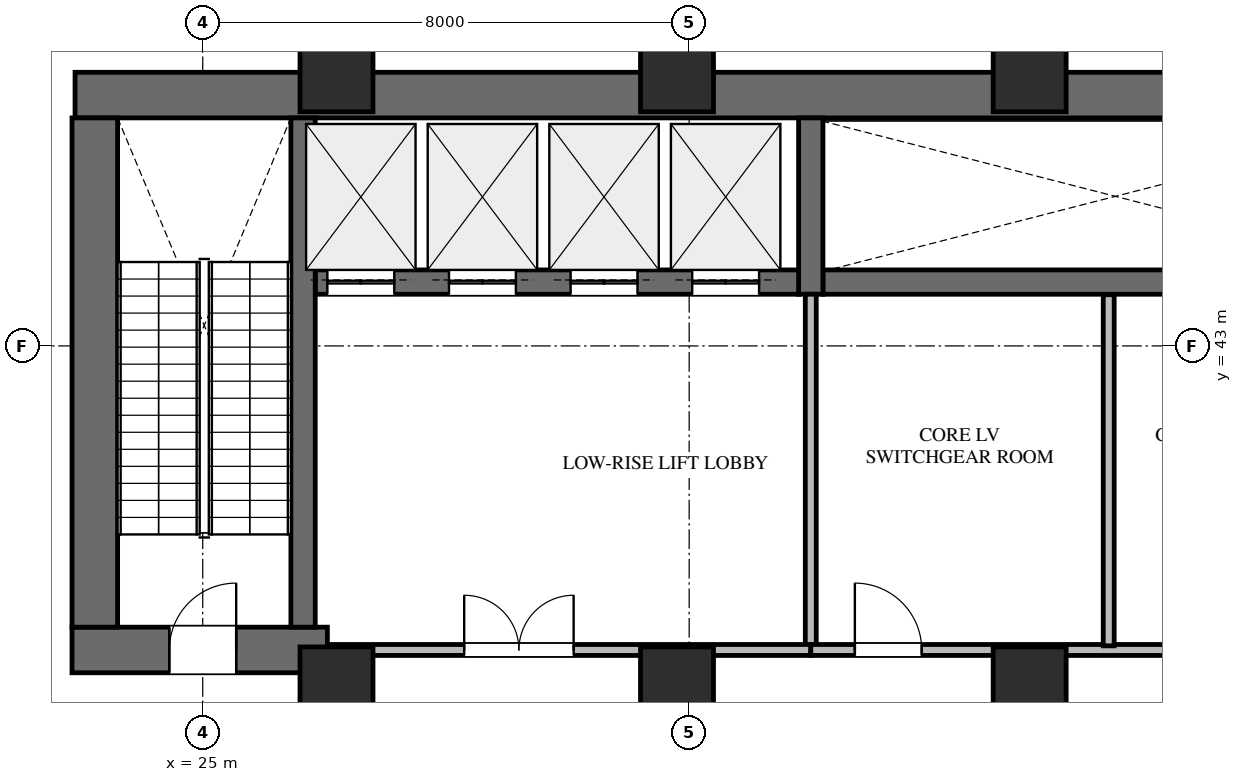
"""IFC4 building model, lengths in metres.
Left out: names, types, materials, properties, quantities, classifications, styles, units other than length and angle.
Written with IfcOpenShell. Run it as: python <this file> out.ifc"""

import sys

from ifc_helpers import new_model, si_unit, direction, frame, frame_2d, origin, origin_2d, place, context, subcontext, project, spatial, rectangle, extrude, element, fill, save


model = new_model("IFC4")
c1 = context("Model", 3, precision=1e-05, world=origin(), true_north=direction((0.0, 1.0)))
c2 = subcontext(c1, "Body", "Model", "MODEL_VIEW")
j1 = project(units=[si_unit("LENGTHUNIT", "METRE"), si_unit("PLANEANGLEUNIT", "RADIAN")], contexts=[c1])
p1 = place(None, origin())
s1 = spatial("IfcSite", under=j1, at=p1, CompositionType="ELEMENT")
p2 = place(p1, origin())
s2 = spatial("IfcBuilding", under=s1, at=p2, CompositionType="ELEMENT")
p3 = place(p2, frame((0.0, 0.0, 85.5)))
s3 = spatial("IfcBuildingStorey", under=s2, at=p3, CompositionType="ELEMENT", Elevation=85.5)
p4 = place(p3, frame((22.9, 47.125, 0.0), z_axis=(0.0, 0.0, 1.0), x_axis=(1.0, 0.0, 0.0)))
e1 = element("IfcWall", 1, at=p4, inside=s3, PredefinedType="SHEAR", context=c2, shape_type="SweptSolid", body=[
    extrude(rectangle(XDim=43.7, YDim=0.75, at=frame_2d((21.85, 0.0))), origin(), (0.0, 0.0, 1.0), 6.0),
])
p5 = place(p3, frame((35.2, 44.05, 0.0), z_axis=(0.0, 0.0, 1.0), x_axis=(1.0, 0.0, 0.0)))
e2 = element("IfcWall", 2, at=p5, inside=s3, PredefinedType="SHEAR", context=c2, shape_type="SweptSolid", body=[
    extrude(rectangle(XDim=9.65, YDim=0.4, at=frame_2d((4.825, 0.0))), origin(), (0.0, 0.0, 1.0), 6.0),
])
p6 = place(p3, frame((35.0, 43.85, 0.0), z_axis=(0.0, 0.0, 1.0), x_axis=(0.0, 1.0, 0.0)))
e3 = element("IfcWall", 3, at=p6, inside=s3, PredefinedType="SHEAR", context=c2, shape_type="SweptSolid", body=[
    extrude(rectangle(XDim=2.9, YDim=0.4, at=frame_2d((1.45, 0.0))), origin(), (0.0, 0.0, 1.0), 6.0),
])
p7 = place(p3, frame((26.85, 44.05, 0.0), z_axis=(0.0, 0.0, 1.0), x_axis=(1.0, 0.0, 0.0)))
e4 = element("IfcWall", 4, at=p7, inside=s3, PredefinedType="SHEAR", context=c2, shape_type="SweptSolid", body=[
    extrude(rectangle(XDim=7.95, YDim=0.4, at=frame_2d((3.975, 0.0))), origin(), (0.0, 0.0, 1.0), 6.0),
])
p8 = place(p7, frame((0.2, 0.0, 0.0)))
e5 = element("IfcOpeningElement", 5, at=p8, cuts=e4, PredefinedType="OPENING", context=c2, shape_type="SweptSolid", body=[
    extrude(rectangle(XDim=1.1, YDim=2.2, at=frame_2d((0.55, 1.1))), frame((0.0, 0.21, 0.0), z_axis=(0.0, -1.0, 0.0), x_axis=(1.0, 0.0, 0.0)), (0.0, 0.0, 1.0), 0.42),
])
p9 = place(p7, frame((2.2, 0.0, 0.0)))
e6 = element("IfcOpeningElement", 6, at=p9, cuts=e4, PredefinedType="OPENING", context=c2, shape_type="SweptSolid", body=[
    extrude(rectangle(XDim=1.1, YDim=2.2, at=frame_2d((0.55, 1.1))), frame((0.0, 0.21, 0.0), z_axis=(0.0, -1.0, 0.0), x_axis=(1.0, 0.0, 0.0)), (0.0, 0.0, 1.0), 0.42),
])
p10 = place(p7, frame((4.2, 0.0, 0.0)))
e7 = element("IfcOpeningElement", 7, at=p10, cuts=e4, PredefinedType="OPENING", context=c2, shape_type="SweptSolid", body=[
    extrude(rectangle(XDim=1.1, YDim=2.2, at=frame_2d((0.55, 1.1))), frame((0.0, 0.21, 0.0), z_axis=(0.0, -1.0, 0.0), x_axis=(1.0, 0.0, 0.0)), (0.0, 0.0, 1.0), 0.42),
])
p11 = place(p7, frame((6.2, 0.0, 0.0)))
e8 = element("IfcOpeningElement", 8, at=p11, cuts=e4, PredefinedType="OPENING", context=c2, shape_type="SweptSolid", body=[
    extrude(rectangle(XDim=1.1, YDim=2.2, at=frame_2d((0.55, 1.1))), frame((0.0, 0.21, 0.0), z_axis=(0.0, -1.0, 0.0), x_axis=(1.0, 0.0, 0.0)), (0.0, 0.0, 1.0), 0.42),
])
p12 = place(p3, frame((22.85, 38.0, 0.0), z_axis=(0.0, 0.0, 1.0), x_axis=(1.0, 0.0, 0.0)))
e9 = element("IfcWall", 9, at=p12, inside=s3, PredefinedType="SHEAR", context=c2, shape_type="SweptSolid", body=[
    extrude(rectangle(XDim=4.2, YDim=0.75, at=frame_2d((2.1, 0.0))), origin(), (0.0, 0.0, 1.0), 6.0),
])
p13 = place(p12, frame((1.6, 0.0, 0.0)))
e10 = element("IfcOpeningElement", 10, at=p13, cuts=e9, PredefinedType="OPENING", context=c2, shape_type="SweptSolid", body=[
    extrude(rectangle(XDim=1.1, YDim=2.2, at=frame_2d((0.55, 1.1))), frame((0.0, 0.385, 0.0), z_axis=(0.0, -1.0, 0.0), x_axis=(1.0, 0.0, 0.0)), (0.0, 0.0, 1.0), 0.77),
])
p14 = place(p3, frame((23.225, 38.375, 0.0), z_axis=(0.0, 0.0, 1.0), x_axis=(0.0, 1.0, 0.0)))
e11 = element("IfcWall", 11, at=p14, inside=s3, PredefinedType="SHEAR", context=c2, shape_type="SweptSolid", body=[
    extrude(rectangle(XDim=8.375, YDim=0.75, at=frame_2d((4.188, 0.0))), origin(), (0.0, 0.0, 1.0), 6.0),
])
p15 = place(p3, frame((26.65, 38.375, 0.0), z_axis=(0.0, 0.0, 1.0), x_axis=(0.0, 1.0, 0.0)))
e12 = element("IfcWall", 12, at=p15, inside=s3, PredefinedType="SHEAR", context=c2, shape_type="SweptSolid", body=[
    extrude(rectangle(XDim=8.375, YDim=0.4, at=frame_2d((4.188, 0.0))), origin(), (0.0, 0.0, 1.0), 6.0),
])
for number, where, z_axis, x_axis in (
    (13, (38.6, 37.35, 0.0), (0.0, 0.0, 1.0), (1.0, 0.0, 0.0)),
    (14, (38.6, 47.55, 0.0), (0.0, 0.0, 1.0), (1.0, 0.0, 0.0)),
    (15, (32.8, 37.35, 0.0), (0.0, 0.0, 1.0), (1.0, 0.0, 0.0)),
    (16, (32.8, 47.55, 0.0), (0.0, 0.0, 1.0), (1.0, 0.0, 0.0)),
    (17, (27.2, 37.35, 0.0), (0.0, 0.0, 1.0), (1.0, 0.0, 0.0)),
    (18, (27.2, 47.55, 0.0), (0.0, 0.0, 1.0), (1.0, 0.0, 0.0)),
):
    element("IfcColumn", number, at=place(p3, frame(where, z_axis=z_axis, x_axis=x_axis)), inside=s3, PredefinedType="COLUMN", context=c2, shape_type="SweptSolid", body=[
        extrude(rectangle(XDim=1.2, YDim=1.4, at=origin_2d()), origin(), (0.0, 0.0, 1.0), 6.0),
    ])
p16 = place(p3, frame((35.0, 38.0, 0.0), z_axis=(0.0, 0.0, 1.0), x_axis=(0.0, 1.0, 0.0)))
e19 = element("IfcWall", 19, at=p16, inside=s3, PredefinedType="STANDARD", context=c2, shape_type="SweptSolid", body=[
    extrude(rectangle(XDim=5.85, YDim=0.18, at=frame_2d((2.925, 0.0))), origin(), (0.0, 0.0, 1.0), 5.745),
])
p17 = place(p3, frame((27.05, 38.0, 0.0), z_axis=(0.0, 0.0, 1.0), x_axis=(1.0, 0.0, 0.0)))
e20 = element("IfcWall", 20, at=p17, inside=s3, PredefinedType="STANDARD", context=c2, shape_type="SweptSolid", body=[
    extrude(rectangle(XDim=7.95, YDim=0.18, at=frame_2d((3.975, 0.0))), origin(), (0.0, 0.0, 1.0), 4.818),
])
p18 = place(p17, frame((2.25, 0.0, 0.0)))
e21 = element("IfcOpeningElement", 21, at=p18, cuts=e20, PredefinedType="OPENING", context=c2, shape_type="SweptSolid", body=[
    extrude(rectangle(XDim=1.8, YDim=2.2, at=frame_2d((0.9, 1.1))), frame((0.0, 0.1, 0.0), z_axis=(0.0, -1.0, 0.0), x_axis=(1.0, 0.0, 0.0)), (0.0, 0.0, 1.0), 0.2),
])
p19 = place(p3, frame((35.0, 38.0, 0.0), z_axis=(0.0, 0.0, 1.0), x_axis=(1.0, 0.0, 0.0)))
e22 = element("IfcWall", 22, at=p19, inside=s3, PredefinedType="STANDARD", context=c2, shape_type="SweptSolid", body=[
    extrude(rectangle(XDim=10.05, YDim=0.18, at=frame_2d((5.025, 0.0))), origin(), (0.0, 0.0, 1.0), 4.818),
])
p20 = place(p19, frame((0.725, 0.0, 0.0)))
e23 = element("IfcOpeningElement", 23, at=p20, cuts=e22, PredefinedType="OPENING", context=c2, shape_type="SweptSolid", body=[
    extrude(rectangle(XDim=1.1, YDim=2.2, at=frame_2d((0.55, 1.1))), frame((0.0, 0.1, 0.0), z_axis=(0.0, -1.0, 0.0), x_axis=(1.0, 0.0, 0.0)), (0.0, 0.0, 1.0), 0.2),
])
p21 = place(p19, frame((6.25, 0.0, 0.0)))
e24 = element("IfcOpeningElement", 24, at=p21, cuts=e22, PredefinedType="OPENING", context=c2, shape_type="SweptSolid", body=[
    extrude(rectangle(XDim=1.1, YDim=2.2, at=frame_2d((0.55, 1.1))), frame((0.0, 0.1, 0.0), z_axis=(0.0, -1.0, 0.0), x_axis=(1.0, 0.0, 0.0)), (0.0, 0.0, 1.0), 0.2),
])
p22 = place(p3, frame((39.9, 38.068, 0.0), z_axis=(0.0, 0.0, 1.0), x_axis=(0.0, 1.0, 0.0)))
e25 = element("IfcWall", 25, at=p22, inside=s3, PredefinedType="STANDARD", context=c2, shape_type="SweptSolid", body=[
    extrude(rectangle(XDim=5.774, YDim=0.18, at=frame_2d((2.887, 0.0))), origin(), (0.0, 0.0, 1.0), 5.745),
])
p23 = place(p13, origin())
e26 = element("IfcDoor", 26, at=p23, inside=s3, OperationType="SINGLE_SWING_RIGHT", PredefinedType="DOOR", context=c2, shape_type="SweptSolid", body=[
    extrude(rectangle(XDim=1.1, YDim=2.2, at=frame_2d((0.55, 1.1))), frame((0.0, 0.025, 0.0), z_axis=(0.0, -1.0, 0.0), x_axis=(1.0, 0.0, 0.0)), (0.0, 0.0, 1.0), 0.05),
])
fill(e10, e26)
p24 = place(p8, origin())
e27 = element("IfcDoor", 27, at=p24, inside=s3, OperationType="DOUBLE_DOOR_SLIDING", PredefinedType="DOOR", context=c2, shape_type="SweptSolid", body=[
    extrude(rectangle(XDim=1.1, YDim=2.2, at=frame_2d((0.55, 1.1))), frame((0.0, 0.025, 0.0), z_axis=(0.0, -1.0, 0.0), x_axis=(1.0, 0.0, 0.0)), (0.0, 0.0, 1.0), 0.05),
])
fill(e5, e27)
p25 = place(p9, origin())
e28 = element("IfcDoor", 28, at=p25, inside=s3, OperationType="DOUBLE_DOOR_SLIDING", PredefinedType="DOOR", context=c2, shape_type="SweptSolid", body=[
    extrude(rectangle(XDim=1.1, YDim=2.2, at=frame_2d((0.55, 1.1))), frame((0.0, 0.025, 0.0), z_axis=(0.0, -1.0, 0.0), x_axis=(1.0, 0.0, 0.0)), (0.0, 0.0, 1.0), 0.05),
])
fill(e6, e28)
p26 = place(p10, origin())
e29 = element("IfcDoor", 29, at=p26, inside=s3, OperationType="DOUBLE_DOOR_SLIDING", PredefinedType="DOOR", context=c2, shape_type="SweptSolid", body=[
    extrude(rectangle(XDim=1.1, YDim=2.2, at=frame_2d((0.55, 1.1))), frame((0.0, 0.025, 0.0), z_axis=(0.0, -1.0, 0.0), x_axis=(1.0, 0.0, 0.0)), (0.0, 0.0, 1.0), 0.05),
])
fill(e7, e29)
p27 = place(p11, origin())
e30 = element("IfcDoor", 30, at=p27, inside=s3, OperationType="DOUBLE_DOOR_SLIDING", PredefinedType="DOOR", context=c2, shape_type="SweptSolid", body=[
    extrude(rectangle(XDim=1.1, YDim=2.2, at=frame_2d((0.55, 1.1))), frame((0.0, 0.025, 0.0), z_axis=(0.0, -1.0, 0.0), x_axis=(1.0, 0.0, 0.0)), (0.0, 0.0, 1.0), 0.05),
])
fill(e8, e30)
p28 = place(p18, origin())
e31 = element("IfcDoor", 31, at=p28, inside=s3, OperationType="DOUBLE_DOOR_SINGLE_SWING", PredefinedType="DOOR", context=c2, shape_type="SweptSolid", body=[
    extrude(rectangle(XDim=1.8, YDim=2.2, at=frame_2d((0.9, 1.1))), frame((0.0, 0.025, 0.0), z_axis=(0.0, -1.0, 0.0), x_axis=(1.0, 0.0, 0.0)), (0.0, 0.0, 1.0), 0.05),
])
fill(e21, e31)
p29 = place(p20, origin())
e32 = element("IfcDoor", 32, at=p29, inside=s3, OperationType="SINGLE_SWING_LEFT", PredefinedType="DOOR", context=c2, shape_type="SweptSolid", body=[
    extrude(rectangle(XDim=1.1, YDim=2.2, at=frame_2d((0.55, 1.1))), frame((0.0, 0.025, 0.0), z_axis=(0.0, -1.0, 0.0), x_axis=(1.0, 0.0, 0.0)), (0.0, 0.0, 1.0), 0.05),
])
fill(e23, e32)
save(model, sys.argv[1])
